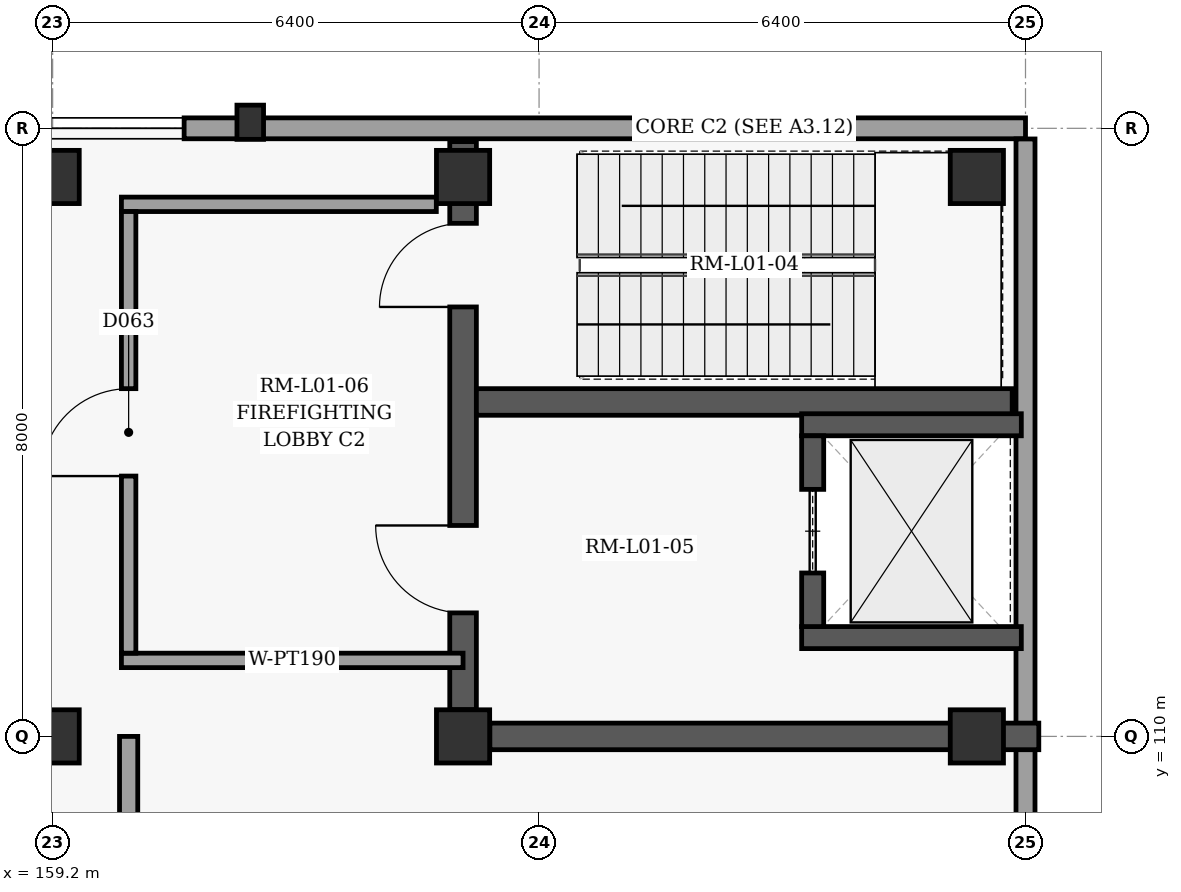
"""IFC4 building model, lengths in metres.
Left out: names, types, materials, properties, quantities, classifications, styles, units other than length and angle.
Written with IfcOpenShell. Run it as: python <this file> out.ifc"""

import sys

from ifc_helpers import new_model, si_unit, direction, frame, frame_2d, origin, origin_2d, place, context, subcontext, project, spatial, rectangle, extrude, element, fill, save


model = new_model("IFC4")
c1 = context("Model", 3, precision=1e-05, world=origin(), true_north=direction((0.0, 1.0)))
c2 = subcontext(c1, "Body", "Model", "MODEL_VIEW")
j1 = project(units=[si_unit("LENGTHUNIT", "METRE"), si_unit("PLANEANGLEUNIT", "RADIAN")], contexts=[c1])
p1 = place(None, origin())
s1 = spatial("IfcSite", under=j1, at=p1, CompositionType="ELEMENT")
p2 = place(p1, origin())
s2 = spatial("IfcBuilding", under=s1, at=p2, CompositionType="ELEMENT")
p3 = place(p2, frame((0.0, 0.0, 5.4)))
s3 = spatial("IfcBuildingStorey", under=s2, at=p3, CompositionType="ELEMENT", Elevation=5.4)
for number, where, z_axis, x_axis in (
    (1, (159.2, 110.0, 0.0), (0.0, 0.0, 1.0), (1.0, 0.0, 0.0)),
    (2, (159.2, 117.36, 0.0), (0.0, 0.0, 1.0), (1.0, 0.0, 0.0)),
    (3, (164.6, 110.0, 0.0), (0.0, 0.0, 1.0), (1.0, 0.0, 0.0)),
    (4, (164.6, 117.36, 0.0), (0.0, 0.0, 1.0), (1.0, 0.0, 0.0)),
    (5, (171.36, 110.0, 0.0), (0.0, 0.0, 1.0), (1.0, 0.0, 0.0)),
    (6, (171.36, 117.36, 0.0), (0.0, 0.0, 1.0), (1.0, 0.0, 0.0)),
):
    element("IfcColumn", number, at=place(p3, frame(where, z_axis=z_axis, x_axis=x_axis)), inside=s3, PredefinedType="COLUMN", context=c2, shape_type="SweptSolid", body=[
        extrude(rectangle(XDim=0.7, YDim=0.7, at=origin_2d()), origin(), (0.0, 0.0, 1.0), 4.8),
    ])
p4 = place(p3, frame((161.8, 118.08, 0.0), z_axis=(0.0, 0.0, 1.0), x_axis=(0.0, 1.0, 0.0)))
e7 = element("IfcColumn", 7, at=p4, inside=s3, PredefinedType="PILASTER", context=c2, shape_type="SweptSolid", body=[
    extrude(rectangle(XDim=0.35, YDim=0.45, at=origin_2d()), origin(), (0.0, 0.0, 1.0), 4.8),
])
p5 = place(p3, frame((139.6, 118.0, 0.0), z_axis=(0.0, 0.0, 1.0), x_axis=(1.0, 0.0, 0.0)))
e8 = element("IfcWall", 8, at=p5, inside=s3, PredefinedType="SOLIDWALL", context=c2, shape_type="SweptSolid", body=[
    extrude(rectangle(XDim=32.4, YDim=0.275, at=frame_2d((16.2, 0.0))), origin(), (0.0, 0.0, 1.0), 4.55),
])
p6 = place(p5, frame((2.2, 0.0, 0.9)))
e9 = element("IfcOpeningElement", 9, at=p6, cuts=e8, PredefinedType="OPENING", context=c2, shape_type="SweptSolid", body=[
    extrude(rectangle(XDim=3.4, YDim=1.85, at=frame_2d((1.7, 0.925))), frame((0.0, 0.147, 0.0), z_axis=(0.0, -1.0, 0.0), x_axis=(1.0, 0.0, 0.0)), (0.0, 0.0, 1.0), 0.295),
])
p7 = place(p5, frame((7.96, 0.0, 0.9)))
e10 = element("IfcOpeningElement", 10, at=p7, cuts=e8, PredefinedType="OPENING", context=c2, shape_type="SweptSolid", body=[
    extrude(rectangle(XDim=3.6, YDim=1.9, at=frame_2d((1.8, 0.95))), frame((0.0, 0.147, 0.0), z_axis=(0.0, -1.0, 0.0), x_axis=(1.0, 0.0, 0.0)), (0.0, 0.0, 1.0), 0.295),
])
p8 = place(p5, frame((13.72, 0.0, 0.9)))
e11 = element("IfcOpeningElement", 11, at=p8, cuts=e8, PredefinedType="OPENING", context=c2, shape_type="SweptSolid", body=[
    extrude(rectangle(XDim=1.6, YDim=1.65, at=frame_2d((0.8, 0.825))), frame((0.0, 0.147, 0.0), z_axis=(0.0, -1.0, 0.0), x_axis=(1.0, 0.0, 0.0)), (0.0, 0.0, 1.0), 0.295),
])
p9 = place(p5, frame((18.73, 0.0, 0.9)))
e12 = element("IfcOpeningElement", 12, at=p9, cuts=e8, PredefinedType="OPENING", context=c2, shape_type="SweptSolid", body=[
    extrude(rectangle(XDim=2.6, YDim=2.35, at=frame_2d((1.3, 1.175))), frame((0.0, 0.147, 0.0), z_axis=(0.0, -1.0, 0.0), x_axis=(1.0, 0.0, 0.0)), (0.0, 0.0, 1.0), 0.295),
])
p10 = place(p3, frame((172.0, 117.86, 0.0), z_axis=(0.0, 0.0, 1.0), x_axis=(0.0, -1.0, 0.0)))
e13 = element("IfcWall", 13, at=p10, inside=s3, PredefinedType="SOLIDWALL", context=c2, shape_type="SweptSolid", body=[
    extrude(rectangle(XDim=46.12, YDim=0.25, at=frame_2d((23.06, 0.0))), origin(), (0.0, 0.0, 1.0), 4.55),
])
p11 = place(p3, frame((164.952, 110.0, 0.0), z_axis=(0.0, 0.0, 1.0), x_axis=(1.0, 0.0, 0.0)))
e14 = element("IfcWall", 14, at=p11, inside=s3, PredefinedType="SHEAR", context=c2, shape_type="SweptSolid", body=[
    extrude(rectangle(XDim=7.223, YDim=0.35, at=frame_2d((3.612, 0.0))), origin(), (0.0, 0.0, 1.0), 4.55),
])
p12 = place(p3, frame((164.6, 110.352, 0.0), z_axis=(0.0, 0.0, 1.0), x_axis=(0.0, 1.0, 0.0)))
e15 = element("IfcWall", 15, at=p12, inside=s3, PredefinedType="SHEAR", context=c2, shape_type="SweptSolid", body=[
    extrude(rectangle(XDim=7.473, YDim=0.35, at=frame_2d((3.736, 0.0))), origin(), (0.0, 0.0, 1.0), 4.55),
])
p13 = place(p12, frame((5.298, 0.0, 0.0)))
e16 = element("IfcOpeningElement", 16, at=p13, cuts=e15, PredefinedType="OPENING", context=c2, shape_type="SweptSolid", body=[
    extrude(rectangle(XDim=1.1, YDim=2.15, at=frame_2d((0.55, 1.075))), frame((0.0, 0.185, 0.0), z_axis=(0.0, -1.0, 0.0), x_axis=(1.0, 0.0, 0.0)), (0.0, 0.0, 1.0), 0.37),
])
p14 = place(p12, frame((1.273, 0.0, 0.0)))
e17 = element("IfcOpeningElement", 17, at=p14, cuts=e15, PredefinedType="OPENING", context=c2, shape_type="SweptSolid", body=[
    extrude(rectangle(XDim=1.15, YDim=2.2, at=frame_2d((0.575, 1.1))), frame((0.0, 0.185, 0.0), z_axis=(0.0, -1.0, 0.0), x_axis=(1.0, 0.0, 0.0)), (0.0, 0.0, 1.0), 0.37),
])
p15 = place(p3, frame((164.775, 114.4, 0.0), z_axis=(0.0, 0.0, 1.0), x_axis=(1.0, 0.0, 0.0)))
e18 = element("IfcWall", 18, at=p15, inside=s3, PredefinedType="SHEAR", context=c2, shape_type="SweptSolid", body=[
    extrude(rectangle(XDim=7.05, YDim=0.35, at=frame_2d((3.525, 0.0))), origin(), (0.0, 0.0, 1.0), 4.55),
])
for number, where, z_axis, x_axis in (
    (19, (169.055, 111.3, 0.0), (0.0, 0.0, 1.0), (1.0, 0.0, 0.0)),
    (20, (169.055, 114.1, 0.0), (0.0, 0.0, 1.0), (1.0, 0.0, 0.0)),
):
    element("IfcWall", number, at=place(p3, frame(where, z_axis=z_axis, x_axis=x_axis)), inside=s3, PredefinedType="SHEAR", context=c2, shape_type="SweptSolid", body=[
        extrude(rectangle(XDim=2.89, YDim=0.29, at=frame_2d((1.445, 0.0))), origin(), (0.0, 0.0, 1.0), 4.55),
    ])
p16 = place(p3, frame((169.2, 111.445, 0.0), z_axis=(0.0, 0.0, 1.0), x_axis=(0.0, 1.0, 0.0)))
e21 = element("IfcWall", 21, at=p16, inside=s3, PredefinedType="SHEAR", context=c2, shape_type="SweptSolid", body=[
    extrude(rectangle(XDim=2.51, YDim=0.29, at=frame_2d((1.255, 0.0))), origin(), (0.0, 0.0, 1.0), 4.55),
])
p17 = place(p16, frame((0.705, 0.0, 0.0)))
e22 = element("IfcOpeningElement", 22, at=p17, cuts=e21, PredefinedType="OPENING", context=c2, shape_type="SweptSolid", body=[
    extrude(rectangle(XDim=1.1, YDim=2.15, at=frame_2d((0.55, 1.075))), frame((0.0, 0.155, 0.0), z_axis=(0.0, -1.0, 0.0), x_axis=(1.0, 0.0, 0.0)), (0.0, 0.0, 1.0), 0.31),
])
p18 = place(p3, frame((160.105, 111.0, 0.0), z_axis=(0.0, 0.0, 1.0), x_axis=(1.0, 0.0, 0.0)))
e23 = element("IfcWall", 23, at=p18, inside=s3, PredefinedType="PARTITIONING", context=c2, shape_type="SweptSolid", body=[
    extrude(rectangle(XDim=4.495, YDim=0.19, at=frame_2d((2.248, 0.0))), origin(), (0.0, 0.0, 1.0), 4.55),
])
p19 = place(p3, frame((160.105, 117.0, 0.0), z_axis=(0.0, 0.0, 1.0), x_axis=(1.0, 0.0, 0.0)))
e24 = element("IfcWall", 24, at=p19, inside=s3, PredefinedType="PARTITIONING", context=c2, shape_type="SweptSolid", body=[
    extrude(rectangle(XDim=4.143, YDim=0.19, at=frame_2d((2.072, 0.0))), origin(), (0.0, 0.0, 1.0), 3.9),
])
p20 = place(p3, frame((160.2, 111.095, 0.0), z_axis=(0.0, 0.0, 1.0), x_axis=(0.0, 1.0, 0.0)))
e25 = element("IfcWall", 25, at=p20, inside=s3, PredefinedType="PARTITIONING", context=c2, shape_type="SweptSolid", body=[
    extrude(rectangle(XDim=5.81, YDim=0.19, at=frame_2d((2.905, 0.0))), origin(), (0.0, 0.0, 1.0), 4.55),
])
p21 = place(p20, frame((2.33, 0.0, 0.0)))
e26 = element("IfcOpeningElement", 26, at=p21, cuts=e25, PredefinedType="OPENING", context=c2, shape_type="SweptSolid", body=[
    extrude(rectangle(XDim=1.15, YDim=2.2, at=frame_2d((0.575, 1.1))), frame((0.0, 0.105, 0.0), z_axis=(0.0, -1.0, 0.0), x_axis=(1.0, 0.0, 0.0)), (0.0, 0.0, 1.0), 0.21),
])
p22 = place(p3, frame((160.2, 110.0, 0.0), z_axis=(0.0, 0.0, 1.0), x_axis=(0.0, -1.0, 0.0)))
e27 = element("IfcWall", 27, at=p22, inside=s3, PredefinedType="PARTITIONING", context=c2, shape_type="SweptSolid", body=[
    extrude(rectangle(XDim=8.0, YDim=0.24, at=frame_2d((4.0, 0.0))), origin(), (0.0, 0.0, 1.0), 4.55),
])
p23 = place(p9, origin())
e28 = element("IfcWindow", 28, at=p23, inside=s3, PartitioningType="SINGLE_PANEL", PredefinedType="WINDOW", context=c2, shape_type="SweptSolid", body=[
    extrude(rectangle(XDim=2.6, YDim=2.35, at=frame_2d((1.3, 1.175))), frame((0.0, 0.03, 0.0), z_axis=(0.0, -1.0, 0.0), x_axis=(1.0, 0.0, 0.0)), (0.0, 0.0, 1.0), 0.06),
])
fill(e12, e28)
p24 = place(p13, origin())
e29 = element("IfcDoor", 29, at=p24, inside=s3, OperationType="SINGLE_SWING_LEFT", PredefinedType="DOOR", context=c2, shape_type="SweptSolid", body=[
    extrude(rectangle(XDim=1.1, YDim=2.15, at=frame_2d((0.55, 1.075))), frame((0.0, 0.025, 0.0), z_axis=(0.0, -1.0, 0.0), x_axis=(1.0, 0.0, 0.0)), (0.0, 0.0, 1.0), 0.05),
])
fill(e16, e29)
p25 = place(p14, origin())
e30 = element("IfcDoor", 30, at=p25, inside=s3, OperationType="SINGLE_SWING_RIGHT", PredefinedType="DOOR", context=c2, shape_type="SweptSolid", body=[
    extrude(rectangle(XDim=1.15, YDim=2.2, at=frame_2d((0.575, 1.1))), frame((0.0, 0.025, 0.0), z_axis=(0.0, -1.0, 0.0), x_axis=(1.0, 0.0, 0.0)), (0.0, 0.0, 1.0), 0.05),
])
fill(e17, e30)
p26 = place(p17, origin())
e31 = element("IfcDoor", 31, at=p26, inside=s3, OperationType="SLIDING_TO_LEFT", PredefinedType="DOOR", context=c2, shape_type="SweptSolid", body=[
    extrude(rectangle(XDim=1.1, YDim=2.15, at=frame_2d((0.55, 1.075))), frame((0.0, 0.025, 0.0), z_axis=(0.0, -1.0, 0.0), x_axis=(1.0, 0.0, 0.0)), (0.0, 0.0, 1.0), 0.05),
])
fill(e22, e31)
p27 = place(p21, origin())
e32 = element("IfcDoor", 32, at=p27, inside=s3, OperationType="SINGLE_SWING_LEFT", PredefinedType="DOOR", context=c2, shape_type="SweptSolid", body=[
    extrude(rectangle(XDim=1.15, YDim=2.2, at=frame_2d((0.575, 1.1))), frame((0.0, 0.025, 0.0), z_axis=(0.0, -1.0, 0.0), x_axis=(1.0, 0.0, 0.0)), (0.0, 0.0, 1.0), 0.05),
])
fill(e26, e32)
save(model, sys.argv[1])
